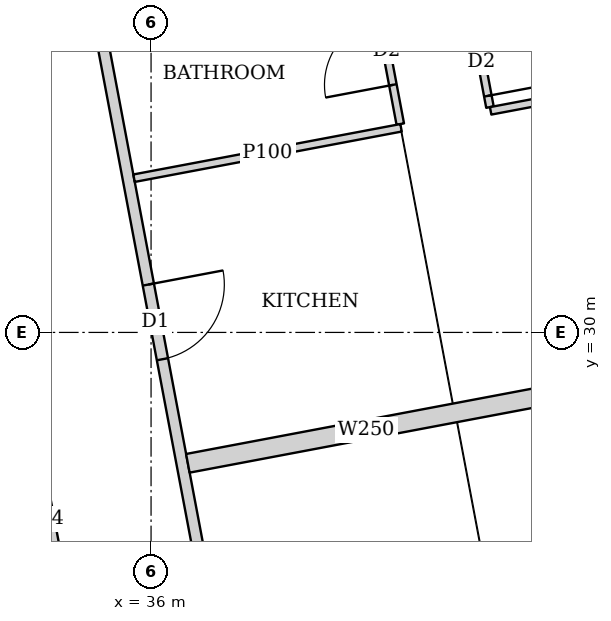
"""IFC4 building model, lengths in metres.
Left out: names, types, materials, properties, quantities, classifications, styles, units other than length and angle.
Written with IfcOpenShell. Run it as: python <this file> out.ifc"""

import sys

from ifc_helpers import new_model, si_unit, direction, frame, frame_2d, origin, place, context, subcontext, project, spatial, rectangle, extrude, element, fill, save


model = new_model("IFC4")
c1 = context("Model", 3, precision=1e-05, world=origin(), true_north=direction((0.0, 1.0)))
c2 = subcontext(c1, "Body", "Model", "MODEL_VIEW")
j1 = project(units=[si_unit("LENGTHUNIT", "METRE"), si_unit("PLANEANGLEUNIT", "RADIAN")], contexts=[c1])
p1 = place(None, origin())
s1 = spatial("IfcSite", under=j1, at=p1, CompositionType="ELEMENT")
p2 = place(p1, origin())
s2 = spatial("IfcBuilding", under=s1, at=p2, CompositionType="ELEMENT")
p3 = place(p2, frame((0.0, 0.0, 204.95)))
s3 = spatial("IfcBuildingStorey", under=s2, at=p3, CompositionType="ELEMENT", Elevation=204.95)
p4 = place(p3, frame((33.68, 42.723, 0.0), z_axis=(0.0, 0.0, 1.0), x_axis=(0.185601160014, -0.982625162207, 0.0)))
e1 = element("IfcWall", 1, at=p4, inside=s3, PredefinedType="SOLIDWALL", context=c2, shape_type="SweptSolid", body=[
    extrude(rectangle(XDim=41.051, YDim=0.15, at=frame_2d((20.526, 0.0))), origin(), (0.0, 0.0, 1.0), 2.5),
])
p5 = place(p4, frame((12.307, 0.0, 0.0)))
e2 = element("IfcOpeningElement", 2, at=p5, cuts=e1, PredefinedType="OPENING", context=c2, shape_type="SweptSolid", body=[
    extrude(rectangle(XDim=1.0, YDim=2.1, at=frame_2d((0.5, 1.05))), frame((0.0, 0.085, 0.0), z_axis=(0.0, -1.0, 0.0), x_axis=(1.0, 0.0, 0.0)), (0.0, 0.0, 1.0), 0.17),
])
p6 = place(p4, frame((16.123, 0.0, 0.0)))
e3 = element("IfcOpeningElement", 3, at=p6, cuts=e1, PredefinedType="OPENING", context=c2, shape_type="SweptSolid", body=[
    extrude(rectangle(XDim=1.0, YDim=2.1, at=frame_2d((0.5, 1.05))), frame((0.0, 0.085, 0.0), z_axis=(0.0, -1.0, 0.0), x_axis=(1.0, 0.0, 0.0)), (0.0, 0.0, 1.0), 0.17),
])
p7 = place(p4, frame((30.902, 0.0, 0.0)))
e4 = element("IfcOpeningElement", 4, at=p7, cuts=e1, PredefinedType="OPENING", context=c2, shape_type="SweptSolid", body=[
    extrude(rectangle(XDim=1.0, YDim=2.1, at=frame_2d((0.5, 1.05))), frame((0.0, 0.085, 0.0), z_axis=(0.0, -1.0, 0.0), x_axis=(1.0, 0.0, 0.0)), (0.0, 0.0, 1.0), 0.17),
])
p8 = place(p3, frame((38.764, 41.941, 0.0), z_axis=(0.0, 0.0, 1.0), x_axis=(0.185548572312, -0.982635093671, 0.0)))
e5 = element("IfcWall", 5, at=p8, inside=s3, PredefinedType="PARTITIONING", context=c2, shape_type="SweptSolid", body=[
    extrude(rectangle(XDim=9.135, YDim=0.1, at=frame_2d((4.568, 0.0))), origin(), (0.0, 0.0, 1.0), 3.5),
])
p9 = place(p8, frame((8.085, 0.0, 0.0)))
e6 = element("IfcOpeningElement", 6, at=p9, cuts=e5, PredefinedType="OPENING", context=c2, shape_type="SweptSolid", body=[
    extrude(rectangle(XDim=0.9, YDim=2.1, at=frame_2d((0.45, 1.05))), frame((0.0, 0.06, 0.0), z_axis=(0.0, -1.0, 0.0), x_axis=(1.0, 0.0, 0.0)), (0.0, 0.0, 1.0), 0.12),
])
p10 = place(p8, frame((3.7, 0.0, 0.0)))
e7 = element("IfcOpeningElement", 7, at=p10, cuts=e5, PredefinedType="OPENING", context=c2, shape_type="SweptSolid", body=[
    extrude(rectangle(XDim=0.9, YDim=2.1, at=frame_2d((0.45, 1.05))), frame((0.0, 0.06, 0.0), z_axis=(0.0, -1.0, 0.0), x_axis=(1.0, 0.0, 0.0)), (0.0, 0.0, 1.0), 0.12),
])
p11 = place(p3, frame((37.473, 42.309, 0.0), z_axis=(0.0, 0.0, 1.0), x_axis=(0.185491912953, -0.982645790827, 0.0)))
e8 = element("IfcWall", 8, at=p11, inside=s3, PredefinedType="PARTITIONING", context=c2, shape_type="SweptSolid", body=[
    extrude(rectangle(XDim=9.737, YDim=0.1, at=frame_2d((4.869, 0.0))), origin(), (0.0, 0.0, 1.0), 3.5),
])
p12 = place(p11, frame((8.312, 0.0, 0.0)))
e9 = element("IfcOpeningElement", 9, at=p12, cuts=e8, PredefinedType="OPENING", context=c2, shape_type="SweptSolid", body=[
    extrude(rectangle(XDim=0.9, YDim=2.1, at=frame_2d((0.45, 1.05))), frame((0.0, 0.06, 0.0), z_axis=(0.0, -1.0, 0.0), x_axis=(1.0, 0.0, 0.0)), (0.0, 0.0, 1.0), 0.12),
])
p13 = place(p11, frame((2.853, 0.0, 0.0)))
e10 = element("IfcOpeningElement", 10, at=p13, cuts=e8, PredefinedType="OPENING", context=c2, shape_type="SweptSolid", body=[
    extrude(rectangle(XDim=0.9, YDim=2.1, at=frame_2d((0.45, 1.05))), frame((0.0, 0.06, 0.0), z_axis=(0.0, -1.0, 0.0), x_axis=(1.0, 0.0, 0.0)), (0.0, 0.0, 1.0), 0.12),
])
p14 = place(p11, frame((5.644, 0.0, 0.0)))
e11 = element("IfcOpeningElement", 11, at=p14, cuts=e8, PredefinedType="OPENING", context=c2, shape_type="SweptSolid", body=[
    extrude(rectangle(XDim=0.9, YDim=2.1, at=frame_2d((0.45, 1.05))), frame((0.0, 0.06, 0.0), z_axis=(0.0, -1.0, 0.0), x_axis=(1.0, 0.0, 0.0)), (0.0, 0.0, 1.0), 0.12),
])
p15 = place(p3, frame((44.693, 33.713, 0.0), z_axis=(0.0, 0.0, 1.0), x_axis=(-0.982633535512, -0.185556823879, 0.0)))
e12 = element("IfcWall", 12, at=p15, inside=s3, PredefinedType="PARTITIONING", context=c2, shape_type="SweptSolid", body=[
    extrude(rectangle(XDim=4.3, YDim=0.1, at=frame_2d((2.15, 0.0))), origin(), (0.0, 0.0, 1.0), 2.05),
])
p16 = place(p3, frame((39.289, 32.692, 0.0), z_axis=(0.0, 0.0, 1.0), x_axis=(-0.982662827464, -0.185401638399, 0.0)))
e13 = element("IfcWall", 13, at=p16, inside=s3, PredefinedType="PARTITIONING", context=c2, shape_type="SweptSolid", body=[
    extrude(rectangle(XDim=3.575, YDim=0.1, at=frame_2d((1.788, 0.0))), origin(), (0.0, 0.0, 1.0), 3.5),
])
p17 = place(p3, frame((41.177, 29.164, 0.0), z_axis=(0.0, 0.0, 1.0), x_axis=(-0.982642846239, -0.185507511263, 0.0)))
e14 = element("IfcWall", 14, at=p17, inside=s3, PredefinedType="SOLIDWALL", context=c2, shape_type="SweptSolid", body=[
    extrude(rectangle(XDim=4.776, YDim=0.25, at=frame_2d((2.388, 0.0))), origin(), (0.0, 0.0, 1.0), 2.5),
])
p18 = place(p3, frame((37.9, 10.413, 0.0), z_axis=(0.0, 0.0, 1.0), x_axis=(-0.185589740669, 0.982627319058, 0.0)))
e15 = element("IfcWall", 15, at=p18, inside=s3, PredefinedType="PARTITIONING", context=c2, shape_type="SweptSolid", body=[
    extrude(rectangle(XDim=24.602, YDim=0.125, at=frame_2d((12.301, 0.0))), origin(), (0.0, 0.0, 1.0), 2.5),
])
p19 = place(p18, frame((0.708, 0.0, 0.0)))
e16 = element("IfcOpeningElement", 16, at=p19, cuts=e15, PredefinedType="OPENING", context=c2, shape_type="SweptSolid", body=[
    extrude(rectangle(XDim=1.0, YDim=2.1, at=frame_2d((0.5, 1.05))), frame((0.0, 0.073, 0.0), z_axis=(0.0, -1.0, 0.0), x_axis=(1.0, 0.0, 0.0)), (0.0, 0.0, 1.0), 0.145),
])
p20 = place(p18, frame((5.65, 0.0, 0.0)))
e17 = element("IfcOpeningElement", 17, at=p20, cuts=e15, PredefinedType="OPENING", context=c2, shape_type="SweptSolid", body=[
    extrude(rectangle(XDim=1.0, YDim=2.1, at=frame_2d((0.5, 1.05))), frame((0.0, 0.073, 0.0), z_axis=(0.0, -1.0, 0.0), x_axis=(1.0, 0.0, 0.0)), (0.0, 0.0, 1.0), 0.145),
])
p21 = place(p18, frame((13.124, 0.0, 0.0)))
e18 = element("IfcOpeningElement", 18, at=p21, cuts=e15, PredefinedType="OPENING", context=c2, shape_type="SweptSolid", body=[
    extrude(rectangle(XDim=1.0, YDim=2.1, at=frame_2d((0.5, 1.05))), frame((0.0, 0.073, 0.0), z_axis=(0.0, -1.0, 0.0), x_axis=(1.0, 0.0, 0.0)), (0.0, 0.0, 1.0), 0.145),
])
p22 = place(p18, frame((16.94, 0.0, 0.0)))
e19 = element("IfcOpeningElement", 19, at=p22, cuts=e15, PredefinedType="OPENING", context=c2, shape_type="SweptSolid", body=[
    extrude(rectangle(XDim=1.0, YDim=2.1, at=frame_2d((0.5, 1.05))), frame((0.0, 0.073, 0.0), z_axis=(0.0, -1.0, 0.0), x_axis=(1.0, 0.0, 0.0)), (0.0, 0.0, 1.0), 0.145),
])
p23 = place(p18, frame((20.9, 0.0, 0.0)))
e20 = element("IfcOpeningElement", 20, at=p23, cuts=e15, PredefinedType="OPENING", context=c2, shape_type="SweptSolid", body=[
    extrude(rectangle(XDim=1.0, YDim=2.1, at=frame_2d((0.5, 1.05))), frame((0.0, 0.073, 0.0), z_axis=(0.0, -1.0, 0.0), x_axis=(1.0, 0.0, 0.0)), (0.0, 0.0, 1.0), 0.145),
])
p24 = place(p9, origin())
e21 = element("IfcDoor", 21, at=p24, inside=s3, OperationType="SINGLE_SWING_RIGHT", PredefinedType="DOOR", context=c2, shape_type="SweptSolid", body=[
    extrude(rectangle(XDim=0.9, YDim=2.1, at=frame_2d((0.45, 1.05))), frame((0.0, 0.025, 0.0), z_axis=(0.0, -1.0, 0.0), x_axis=(1.0, 0.0, 0.0)), (0.0, 0.0, 1.0), 0.05),
])
fill(e6, e21)
p25 = place(p12, origin())
e22 = element("IfcDoor", 22, at=p25, inside=s3, OperationType="SINGLE_SWING_LEFT", PredefinedType="DOOR", context=c2, shape_type="SweptSolid", body=[
    extrude(rectangle(XDim=0.9, YDim=2.1, at=frame_2d((0.45, 1.05))), frame((0.0, 0.025, 0.0), z_axis=(0.0, -1.0, 0.0), x_axis=(1.0, 0.0, 0.0)), (0.0, 0.0, 1.0), 0.05),
])
fill(e9, e22)
p26 = place(p5, origin())
e23 = element("IfcDoor", 23, at=p26, inside=s3, OperationType="SINGLE_SWING_LEFT", PredefinedType="DOOR", context=c2, shape_type="SweptSolid", body=[
    extrude(rectangle(XDim=1.0, YDim=2.1, at=frame_2d((0.5, 1.05))), frame((0.0, 0.025, 0.0), z_axis=(0.0, -1.0, 0.0), x_axis=(1.0, 0.0, 0.0)), (0.0, 0.0, 1.0), 0.05),
])
fill(e2, e23)
p27 = place(p22, origin())
e24 = element("IfcDoor", 24, at=p27, inside=s3, OperationType="SINGLE_SWING_LEFT", PredefinedType="DOOR", context=c2, shape_type="SweptSolid", body=[
    extrude(rectangle(XDim=1.0, YDim=2.1, at=frame_2d((0.5, 1.05))), frame((0.0, 0.025, 0.0), z_axis=(0.0, -1.0, 0.0), x_axis=(1.0, 0.0, 0.0)), (0.0, 0.0, 1.0), 0.05),
])
fill(e19, e24)
save(model, sys.argv[1])
